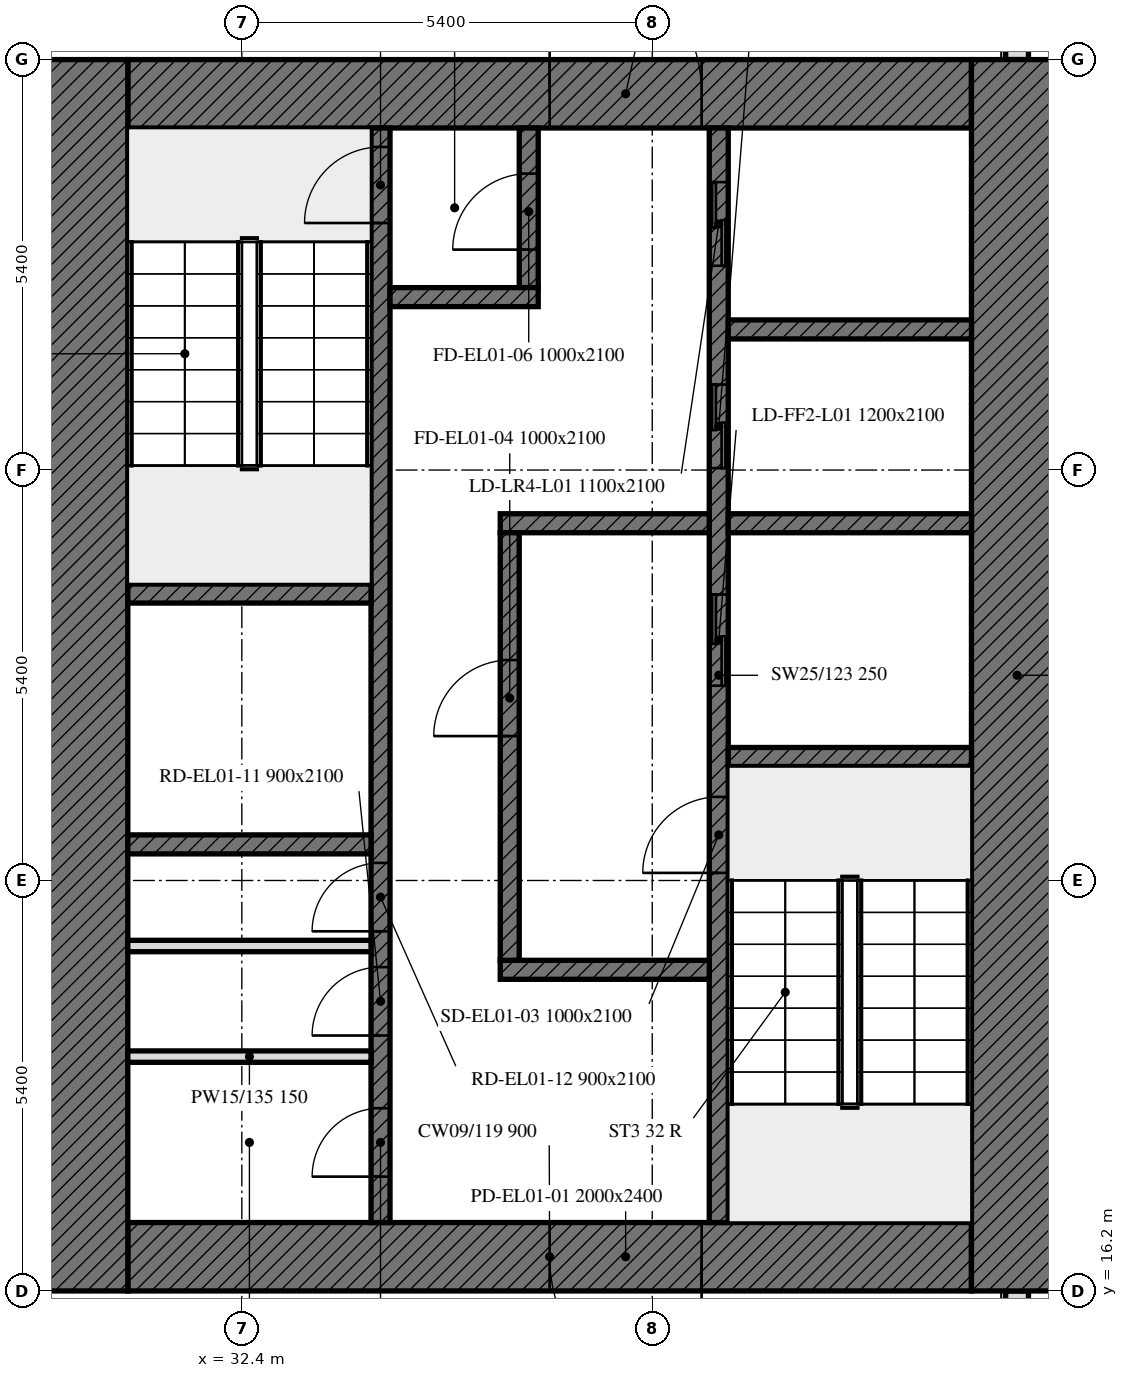
"""IFC4 building model, lengths in metres.
Left out: names, types, materials, properties, quantities, classifications, styles, units other than length and angle.
Written with IfcOpenShell. Run it as: python <this file> out.ifc"""

import sys

from ifc_helpers import new_model, si_unit, direction, frame, frame_2d, origin, place, context, subcontext, project, spatial, rectangle, extrude, element, fill, save


model = new_model("IFC4")
c1 = context("Model", 3, precision=1e-05, world=origin(), true_north=direction((0.0, 1.0)))
c2 = subcontext(c1, "Body", "Model", "MODEL_VIEW")
j1 = project(units=[si_unit("LENGTHUNIT", "METRE"), si_unit("PLANEANGLEUNIT", "RADIAN")], contexts=[c1])
p1 = place(None, origin())
s1 = spatial("IfcSite", under=j1, at=p1, CompositionType="ELEMENT")
p2 = place(p1, origin())
s2 = spatial("IfcBuilding", under=s1, at=p2, CompositionType="ELEMENT")
p3 = place(p2, frame((0.0, 0.0, 8.4)))
s3 = spatial("IfcBuildingStorey", under=s2, at=p3, CompositionType="ELEMENT", Elevation=8.4)
p4 = place(p3, frame((42.6, 10.8, 0.0), z_axis=(0.0, 0.0, 1.0), x_axis=(0.0, 1.0, 0.0)))
e1 = element("IfcWall", 1, at=p4, inside=s3, PredefinedType="SOLIDWALL", context=c2, shape_type="SweptSolid", body=[
    extrude(rectangle(XDim=5.4, YDim=0.3, at=frame_2d((2.7, 0.0))), origin(), (0.0, 0.0, 1.0), 5.6),
])
p5 = place(p4, frame((2.7, 0.0, 0.0)))
e2 = element("IfcOpeningElement", 2, at=p5, cuts=e1, PredefinedType="OPENING", context=c2, shape_type="SweptSolid", body=[
    extrude(rectangle(XDim=1.8, YDim=2.4, at=frame_2d((0.9, 1.2))), frame((0.0, 0.16, 0.0), z_axis=(0.0, -1.0, 0.0), x_axis=(1.0, 0.0, 0.0)), (0.0, 0.0, 1.0), 0.32),
])
p6 = place(p3, frame((42.6, 32.4, 0.0), z_axis=(0.0, 0.0, 1.0), x_axis=(0.0, 1.0, 0.0)))
e3 = element("IfcWall", 3, at=p6, inside=s3, PredefinedType="SOLIDWALL", context=c2, shape_type="SweptSolid", body=[
    extrude(rectangle(XDim=5.214, YDim=0.3, at=frame_2d((2.607, 0.0))), origin(), (0.0, 0.0, 1.0), 5.6),
])
p7 = place(p6, frame((1.5, 0.0, 0.0)))
e4 = element("IfcOpeningElement", 4, at=p7, cuts=e3, PredefinedType="OPENING", context=c2, shape_type="SweptSolid", body=[
    extrude(rectangle(XDim=1.2, YDim=2.4, at=frame_2d((0.6, 1.2))), frame((0.0, 0.16, 0.0), z_axis=(0.0, -1.0, 0.0), x_axis=(1.0, 0.0, 0.0)), (0.0, 0.0, 1.0), 0.32),
])
p8 = place(p3, frame((42.0, 16.65, 0.0), z_axis=(0.0, 0.0, 1.0), x_axis=(-1.0, 0.0, 0.0)))
e5 = element("IfcWall", 5, at=p8, inside=s3, PredefinedType="SOLIDWALL", context=c2, shape_type="SweptSolid", body=[
    extrude(rectangle(XDim=11.1, YDim=0.9, at=frame_2d((5.55, 0.0))), origin(), (0.0, 0.0, 1.0), 5.6),
])
p9 = place(p8, frame((3.55, 0.0, 0.0)))
e6 = element("IfcOpeningElement", 6, at=p9, cuts=e5, PredefinedType="OPENING", context=c2, shape_type="SweptSolid", body=[
    extrude(rectangle(XDim=2.0, YDim=2.4, at=frame_2d((1.0, 1.2))), frame((0.0, 0.45, 0.0), z_axis=(0.0, -1.0, 0.0), x_axis=(1.0, 0.0, 0.0)), (0.0, 0.0, 1.0), 0.9),
])
p10 = place(p3, frame((30.9, 31.95, 0.0), z_axis=(0.0, 0.0, 1.0), x_axis=(1.0, 0.0, 0.0)))
e7 = element("IfcWall", 7, at=p10, inside=s3, PredefinedType="SOLIDWALL", context=c2, shape_type="SweptSolid", body=[
    extrude(rectangle(XDim=11.1, YDim=0.9, at=frame_2d((5.55, 0.0))), origin(), (0.0, 0.0, 1.0), 5.6),
])
p11 = place(p10, frame((5.55, 0.0, 0.0)))
e8 = element("IfcOpeningElement", 8, at=p11, cuts=e7, PredefinedType="OPENING", context=c2, shape_type="SweptSolid", body=[
    extrude(rectangle(XDim=2.0, YDim=2.4, at=frame_2d((1.0, 1.2))), frame((0.0, 0.45, 0.0), z_axis=(0.0, -1.0, 0.0), x_axis=(1.0, 0.0, 0.0)), (0.0, 0.0, 1.0), 0.9),
])
for number, where, z_axis, x_axis in (
    (9, (42.6, 32.4, 0.0), (0.0, 0.0, 1.0), (0.0, -1.0, 0.0)),
    (10, (30.3, 16.2, 0.0), (0.0, 0.0, 1.0), (0.0, 1.0, 0.0)),
):
    element("IfcWall", number, at=place(p3, frame(where, z_axis=z_axis, x_axis=x_axis)), inside=s3, PredefinedType="SOLIDWALL", context=c2, shape_type="SweptSolid", body=[
        extrude(rectangle(XDim=16.2, YDim=1.2, at=frame_2d((8.1, 0.0))), origin(), (0.0, 0.0, 1.0), 5.6),
    ])
p12 = place(p3, frame((38.675, 17.1, 0.0), z_axis=(0.0, 0.0, 1.0), x_axis=(0.0, 1.0, 0.0)))
e11 = element("IfcWall", 11, at=p12, inside=s3, PredefinedType="SOLIDWALL", context=c2, shape_type="SweptSolid", body=[
    extrude(rectangle(XDim=14.4, YDim=0.25, at=frame_2d((7.2, 0.0))), origin(), (0.0, 0.0, 1.0), 5.6),
])
p13 = place(p12, frame((4.6, 0.0, 0.0)))
e12 = element("IfcOpeningElement", 12, at=p13, cuts=e11, PredefinedType="OPENING", context=c2, shape_type="SweptSolid", body=[
    extrude(rectangle(XDim=1.0, YDim=2.1, at=frame_2d((0.5, 1.05))), frame((0.0, 0.125, 0.0), z_axis=(0.0, -1.0, 0.0), x_axis=(1.0, 0.0, 0.0)), (0.0, 0.0, 1.0), 0.25),
])
p14 = place(p12, frame((7.062, 0.0, 0.0)))
e13 = element("IfcOpeningElement", 13, at=p14, cuts=e11, PredefinedType="OPENING", context=c2, shape_type="SweptSolid", body=[
    extrude(rectangle(XDim=1.2, YDim=2.1, at=frame_2d((0.6, 1.05))), frame((0.0, 0.125, 0.0), z_axis=(0.0, -1.0, 0.0), x_axis=(1.0, 0.0, 0.0)), (0.0, 0.0, 1.0), 0.25),
])
p15 = place(p12, frame((9.925, 0.0, 0.0)))
e14 = element("IfcOpeningElement", 14, at=p15, cuts=e11, PredefinedType="OPENING", context=c2, shape_type="SweptSolid", body=[
    extrude(rectangle(XDim=1.1, YDim=2.1, at=frame_2d((0.55, 1.05))), frame((0.0, 0.125, 0.0), z_axis=(0.0, -1.0, 0.0), x_axis=(1.0, 0.0, 0.0)), (0.0, 0.0, 1.0), 0.25),
])
p16 = place(p12, frame((12.587, 0.0, 0.0)))
e15 = element("IfcOpeningElement", 15, at=p16, cuts=e11, PredefinedType="OPENING", context=c2, shape_type="SweptSolid", body=[
    extrude(rectangle(XDim=1.1, YDim=2.1, at=frame_2d((0.55, 1.05))), frame((0.0, 0.125, 0.0), z_axis=(0.0, -1.0, 0.0), x_axis=(1.0, 0.0, 0.0)), (0.0, 0.0, 1.0), 0.25),
])
p17 = place(p3, frame((34.225, 17.1, 0.0), z_axis=(0.0, 0.0, 1.0), x_axis=(0.0, 1.0, 0.0)))
e16 = element("IfcWall", 16, at=p17, inside=s3, PredefinedType="SOLIDWALL", context=c2, shape_type="SweptSolid", body=[
    extrude(rectangle(XDim=14.4, YDim=0.25, at=frame_2d((7.2, 0.0))), origin(), (0.0, 0.0, 1.0), 5.6),
])
p18 = place(p17, frame((13.15, 0.0, 0.0)))
e17 = element("IfcOpeningElement", 17, at=p18, cuts=e16, PredefinedType="OPENING", context=c2, shape_type="SweptSolid", body=[
    extrude(rectangle(XDim=1.0, YDim=2.1, at=frame_2d((0.5, 1.05))), frame((0.0, 0.125, 0.0), z_axis=(0.0, -1.0, 0.0), x_axis=(1.0, 0.0, 0.0)), (0.0, 0.0, 1.0), 0.25),
])
p19 = place(p17, frame((0.604, 0.0, 0.0)))
e18 = element("IfcOpeningElement", 18, at=p19, cuts=e16, PredefinedType="OPENING", context=c2, shape_type="SweptSolid", body=[
    extrude(rectangle(XDim=0.9, YDim=2.1, at=frame_2d((0.45, 1.05))), frame((0.0, 0.125, 0.0), z_axis=(0.0, -1.0, 0.0), x_axis=(1.0, 0.0, 0.0)), (0.0, 0.0, 1.0), 0.25),
])
p20 = place(p17, frame((2.46, 0.0, 0.0)))
e19 = element("IfcOpeningElement", 19, at=p20, cuts=e16, PredefinedType="OPENING", context=c2, shape_type="SweptSolid", body=[
    extrude(rectangle(XDim=0.9, YDim=2.1, at=frame_2d((0.45, 1.05))), frame((0.0, 0.125, 0.0), z_axis=(0.0, -1.0, 0.0), x_axis=(1.0, 0.0, 0.0)), (0.0, 0.0, 1.0), 0.25),
])
p21 = place(p17, frame((3.832, 0.0, 0.0)))
e20 = element("IfcOpeningElement", 20, at=p21, cuts=e16, PredefinedType="OPENING", context=c2, shape_type="SweptSolid", body=[
    extrude(rectangle(XDim=0.9, YDim=2.1, at=frame_2d((0.45, 1.05))), frame((0.0, 0.125, 0.0), z_axis=(0.0, -1.0, 0.0), x_axis=(1.0, 0.0, 0.0)), (0.0, 0.0, 1.0), 0.25),
])
p22 = place(p3, frame((38.8, 23.225, 0.0), z_axis=(0.0, 0.0, 1.0), x_axis=(1.0, 0.0, 0.0)))
e21 = element("IfcWall", 21, at=p22, inside=s3, PredefinedType="SOLIDWALL", context=c2, shape_type="SweptSolid", body=[
    extrude(rectangle(XDim=3.2, YDim=0.25, at=frame_2d((1.6, 0.0))), origin(), (0.0, 0.0, 1.0), 5.6),
])
for number, where, z_axis, x_axis in (
    (22, (30.9, 25.375, 0.0), (0.0, 0.0, 1.0), (1.0, 0.0, 0.0)),
    (23, (30.9, 22.075, 0.0), (0.0, 0.0, 1.0), (1.0, 0.0, 0.0)),
):
    element("IfcWall", number, at=place(p3, frame(where, z_axis=z_axis, x_axis=x_axis)), inside=s3, PredefinedType="SOLIDWALL", context=c2, shape_type="SweptSolid", body=[
        extrude(rectangle(XDim=3.2, YDim=0.25, at=frame_2d((1.6, 0.0))), origin(), (0.0, 0.0, 1.0), 5.6),
    ])
p23 = place(p3, frame((38.8, 26.3, 0.0), z_axis=(0.0, 0.0, 1.0), x_axis=(1.0, 0.0, 0.0)))
e24 = element("IfcWall", 24, at=p23, inside=s3, PredefinedType="SOLIDWALL", context=c2, shape_type="SweptSolid", body=[
    extrude(rectangle(XDim=3.2, YDim=0.25, at=frame_2d((1.6, 0.0))), origin(), (0.0, 0.0, 1.0), 5.6),
])
for number, where, z_axis, x_axis in (
    (25, (35.8, 26.3, 0.0), (0.0, 0.0, 1.0), (1.0, 0.0, 0.0)),
    (26, (35.8, 20.425, 0.0), (0.0, 0.0, 1.0), (1.0, 0.0, 0.0)),
):
    element("IfcWall", number, at=place(p3, frame(where, z_axis=z_axis, x_axis=x_axis)), inside=s3, PredefinedType="SOLIDWALL", context=c2, shape_type="SweptSolid", body=[
        extrude(rectangle(XDim=2.75, YDim=0.25, at=frame_2d((1.375, 0.0))), origin(), (0.0, 0.0, 1.0), 5.6),
    ])
p24 = place(p3, frame((36.175, 29.4, 0.0), z_axis=(0.0, 0.0, 1.0), x_axis=(0.0, 1.0, 0.0)))
e27 = element("IfcWall", 27, at=p24, inside=s3, PredefinedType="SOLIDWALL", context=c2, shape_type="SweptSolid", body=[
    extrude(rectangle(XDim=2.1, YDim=0.25, at=frame_2d((1.05, 0.0))), origin(), (0.0, 0.0, 1.0), 5.6),
])
p25 = place(p24, frame((0.5, 0.0, 0.0)))
e28 = element("IfcOpeningElement", 28, at=p25, cuts=e27, PredefinedType="OPENING", context=c2, shape_type="SweptSolid", body=[
    extrude(rectangle(XDim=1.0, YDim=2.1, at=frame_2d((0.5, 1.05))), frame((0.0, 0.125, 0.0), z_axis=(0.0, -1.0, 0.0), x_axis=(1.0, 0.0, 0.0)), (0.0, 0.0, 1.0), 0.25),
])
p26 = place(p3, frame((34.35, 29.275, 0.0), z_axis=(0.0, 0.0, 1.0), x_axis=(1.0, 0.0, 0.0)))
e29 = element("IfcWall", 29, at=p26, inside=s3, PredefinedType="SOLIDWALL", context=c2, shape_type="SweptSolid", body=[
    extrude(rectangle(XDim=1.95, YDim=0.25, at=frame_2d((0.975, 0.0))), origin(), (0.0, 0.0, 1.0), 5.6),
])
p27 = place(p3, frame((35.925, 20.55, 0.0), z_axis=(0.0, 0.0, 1.0), x_axis=(0.0, 1.0, 0.0)))
e30 = element("IfcWall", 30, at=p27, inside=s3, PredefinedType="SOLIDWALL", context=c2, shape_type="SweptSolid", body=[
    extrude(rectangle(XDim=5.625, YDim=0.25, at=frame_2d((2.812, 0.0))), origin(), (0.0, 0.0, 1.0), 5.6),
])
p28 = place(p27, frame((2.95, 0.0, 0.0)))
e31 = element("IfcOpeningElement", 31, at=p28, cuts=e30, PredefinedType="OPENING", context=c2, shape_type="SweptSolid", body=[
    extrude(rectangle(XDim=1.0, YDim=2.1, at=frame_2d((0.5, 1.05))), frame((0.0, 0.125, 0.0), z_axis=(0.0, -1.0, 0.0), x_axis=(1.0, 0.0, 0.0)), (0.0, 0.0, 1.0), 0.25),
])
p29 = place(p3, frame((38.8, 28.85, 0.0), z_axis=(0.0, 0.0, 1.0), x_axis=(1.0, 0.0, 0.0)))
e32 = element("IfcWall", 32, at=p29, inside=s3, PredefinedType="SOLIDWALL", context=c2, shape_type="SweptSolid", body=[
    extrude(rectangle(XDim=3.2, YDim=0.25, at=frame_2d((1.6, 0.0))), origin(), (0.0, 0.0, 1.0), 5.6),
])
for number, where, z_axis, x_axis in (
    (33, (30.9, 19.283, 0.0), (0.0, 0.0, 1.0), (1.0, 0.0, 0.0)),
    (34, (30.9, 20.738, 0.0), (0.0, 0.0, 1.0), (1.0, 0.0, 0.0)),
):
    element("IfcWall", number, at=place(p3, frame(where, z_axis=z_axis, x_axis=x_axis)), inside=s3, PredefinedType="PARTITIONING", context=c2, shape_type="SweptSolid", body=[
        extrude(rectangle(XDim=3.2, YDim=0.15, at=frame_2d((1.6, 0.0))), origin(), (0.0, 0.0, 1.0), 5.6),
    ])
p30 = place(p9, origin())
e35 = element("IfcDoor", 35, at=p30, inside=s3, OperationType="DOUBLE_DOOR_SINGLE_SWING", PredefinedType="DOOR", context=c2, shape_type="SweptSolid", body=[
    extrude(rectangle(XDim=2.0, YDim=2.4, at=frame_2d((1.0, 1.2))), frame((0.0, 0.025, 0.0), z_axis=(0.0, -1.0, 0.0), x_axis=(1.0, 0.0, 0.0)), (0.0, 0.0, 1.0), 0.05),
])
fill(e6, e35)
p31 = place(p11, origin())
e36 = element("IfcDoor", 36, at=p31, inside=s3, OperationType="DOUBLE_DOOR_SINGLE_SWING", PredefinedType="DOOR", context=c2, shape_type="SweptSolid", body=[
    extrude(rectangle(XDim=2.0, YDim=2.4, at=frame_2d((1.0, 1.2))), frame((0.0, 0.025, 0.0), z_axis=(0.0, -1.0, 0.0), x_axis=(1.0, 0.0, 0.0)), (0.0, 0.0, 1.0), 0.05),
])
fill(e8, e36)
p32 = place(p13, origin())
e37 = element("IfcDoor", 37, at=p32, inside=s3, OperationType="SINGLE_SWING_LEFT", PredefinedType="DOOR", context=c2, shape_type="SweptSolid", body=[
    extrude(rectangle(XDim=1.0, YDim=2.1, at=frame_2d((0.5, 1.05))), frame((0.0, 0.025, 0.0), z_axis=(0.0, -1.0, 0.0), x_axis=(1.0, 0.0, 0.0)), (0.0, 0.0, 1.0), 0.05),
])
fill(e12, e37)
p33 = place(p28, origin())
e38 = element("IfcDoor", 38, at=p33, inside=s3, OperationType="SINGLE_SWING_LEFT", PredefinedType="DOOR", context=c2, shape_type="SweptSolid", body=[
    extrude(rectangle(XDim=1.0, YDim=2.1, at=frame_2d((0.5, 1.05))), frame((0.0, 0.025, 0.0), z_axis=(0.0, -1.0, 0.0), x_axis=(1.0, 0.0, 0.0)), (0.0, 0.0, 1.0), 0.05),
])
fill(e31, e38)
p34 = place(p18, origin())
e39 = element("IfcDoor", 39, at=p34, inside=s3, OperationType="SINGLE_SWING_LEFT", PredefinedType="DOOR", context=c2, shape_type="SweptSolid", body=[
    extrude(rectangle(XDim=1.0, YDim=2.1, at=frame_2d((0.5, 1.05))), frame((0.0, 0.025, 0.0), z_axis=(0.0, -1.0, 0.0), x_axis=(1.0, 0.0, 0.0)), (0.0, 0.0, 1.0), 0.05),
])
fill(e17, e39)
p35 = place(p25, origin())
e40 = element("IfcDoor", 40, at=p35, inside=s3, OperationType="SINGLE_SWING_LEFT", PredefinedType="DOOR", context=c2, shape_type="SweptSolid", body=[
    extrude(rectangle(XDim=1.0, YDim=2.1, at=frame_2d((0.5, 1.05))), frame((0.0, 0.025, 0.0), z_axis=(0.0, -1.0, 0.0), x_axis=(1.0, 0.0, 0.0)), (0.0, 0.0, 1.0), 0.05),
])
fill(e28, e40)
p36 = place(p14, origin())
e41 = element("IfcDoor", 41, at=p36, inside=s3, OperationType="DOUBLE_DOOR_SLIDING", PredefinedType="DOOR", context=c2, shape_type="SweptSolid", body=[
    extrude(rectangle(XDim=1.2, YDim=2.1, at=frame_2d((0.6, 1.05))), frame((0.0, 0.025, 0.0), z_axis=(0.0, -1.0, 0.0), x_axis=(1.0, 0.0, 0.0)), (0.0, 0.0, 1.0), 0.05),
])
fill(e13, e41)
p37 = place(p15, origin())
e42 = element("IfcDoor", 42, at=p37, inside=s3, OperationType="DOUBLE_DOOR_SLIDING", PredefinedType="DOOR", context=c2, shape_type="SweptSolid", body=[
    extrude(rectangle(XDim=1.1, YDim=2.1, at=frame_2d((0.55, 1.05))), frame((0.0, 0.025, 0.0), z_axis=(0.0, -1.0, 0.0), x_axis=(1.0, 0.0, 0.0)), (0.0, 0.0, 1.0), 0.05),
])
fill(e14, e42)
p38 = place(p16, origin())
e43 = element("IfcDoor", 43, at=p38, inside=s3, OperationType="DOUBLE_DOOR_SLIDING", PredefinedType="DOOR", context=c2, shape_type="SweptSolid", body=[
    extrude(rectangle(XDim=1.1, YDim=2.1, at=frame_2d((0.55, 1.05))), frame((0.0, 0.025, 0.0), z_axis=(0.0, -1.0, 0.0), x_axis=(1.0, 0.0, 0.0)), (0.0, 0.0, 1.0), 0.05),
])
fill(e15, e43)
p39 = place(p19, origin())
e44 = element("IfcDoor", 44, at=p39, inside=s3, OperationType="SINGLE_SWING_LEFT", PredefinedType="DOOR", context=c2, shape_type="SweptSolid", body=[
    extrude(rectangle(XDim=0.9, YDim=2.1, at=frame_2d((0.45, 1.05))), frame((0.0, 0.025, 0.0), z_axis=(0.0, -1.0, 0.0), x_axis=(1.0, 0.0, 0.0)), (0.0, 0.0, 1.0), 0.05),
])
fill(e18, e44)
p40 = place(p20, origin())
e45 = element("IfcDoor", 45, at=p40, inside=s3, OperationType="SINGLE_SWING_LEFT", PredefinedType="DOOR", context=c2, shape_type="SweptSolid", body=[
    extrude(rectangle(XDim=0.9, YDim=2.1, at=frame_2d((0.45, 1.05))), frame((0.0, 0.025, 0.0), z_axis=(0.0, -1.0, 0.0), x_axis=(1.0, 0.0, 0.0)), (0.0, 0.0, 1.0), 0.05),
])
fill(e19, e45)
p41 = place(p21, origin())
e46 = element("IfcDoor", 46, at=p41, inside=s3, OperationType="SINGLE_SWING_LEFT", PredefinedType="DOOR", context=c2, shape_type="SweptSolid", body=[
    extrude(rectangle(XDim=0.9, YDim=2.1, at=frame_2d((0.45, 1.05))), frame((0.0, 0.025, 0.0), z_axis=(0.0, -1.0, 0.0), x_axis=(1.0, 0.0, 0.0)), (0.0, 0.0, 1.0), 0.05),
])
fill(e20, e46)
save(model, sys.argv[1])
